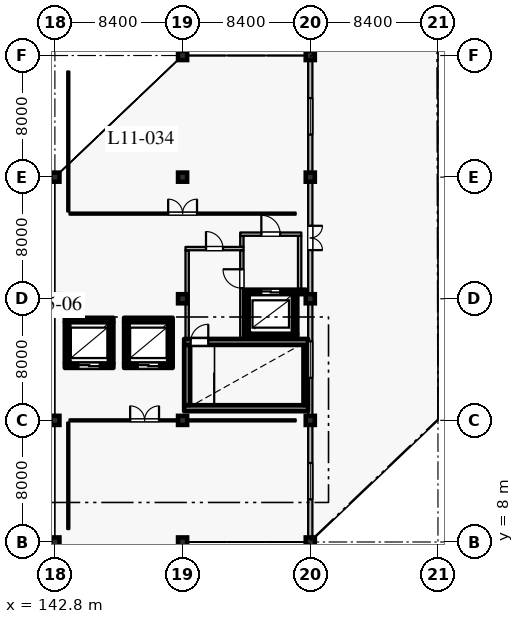
"""IFC4 building model, lengths in metres.
Left out: names, types, materials, properties, quantities, classifications, styles, units other than length and angle.
Written with IfcOpenShell. Run it as: python <this file> out.ifc"""

import sys

from ifc_helpers import new_model, si_unit, direction, frame, frame_2d, origin, origin_2d, place, context, subcontext, project, spatial, rectangle, extrude, element, fill, save


model = new_model("IFC4")
c1 = context("Model", 3, precision=1e-05, world=origin(), true_north=direction((0.0, 1.0)))
c2 = subcontext(c1, "Body", "Model", "MODEL_VIEW")
j1 = project(units=[si_unit("LENGTHUNIT", "METRE"), si_unit("PLANEANGLEUNIT", "RADIAN")], contexts=[c1])
p1 = place(None, origin())
s1 = spatial("IfcSite", under=j1, at=p1, CompositionType="ELEMENT")
p2 = place(p1, origin())
s2 = spatial("IfcBuilding", under=s1, at=p2, CompositionType="ELEMENT")
p3 = place(p2, frame((0.0, 0.0, 47.4)))
s3 = spatial("IfcBuildingStorey", under=s2, at=p3, CompositionType="ELEMENT", Elevation=47.4)
for number, where, z_axis, x_axis in (
    (1, (142.8, 16.0, 0.0), (0.0, 0.0, 1.0), (1.0, 0.0, 0.0)),
    (2, (142.8, 32.0, 0.0), (0.0, 0.0, 1.0), (1.0, 0.0, 0.0)),
    (3, (151.2, 8.0, 0.0), (0.0, 0.0, 1.0), (1.0, 0.0, 0.0)),
    (4, (151.2, 24.0, 0.0), (0.0, 0.0, 1.0), (1.0, 0.0, 0.0)),
    (5, (151.2, 40.0, 0.0), (0.0, 0.0, 1.0), (1.0, 0.0, 0.0)),
    (6, (159.6, 8.0, 0.0), (0.0, 0.0, 1.0), (1.0, 0.0, 0.0)),
    (7, (159.6, 24.0, 0.0), (0.0, 0.0, 1.0), (1.0, 0.0, 0.0)),
    (8, (159.6, 40.0, 0.0), (0.0, 0.0, 1.0), (1.0, 0.0, 0.0)),
    (9, (142.8, 8.0, 0.0), (0.0, 0.0, 1.0), (1.0, 0.0, 0.0)),
    (10, (142.8, 24.0, 0.0), (0.0, 0.0, 1.0), (1.0, 0.0, 0.0)),
    (11, (151.2, 16.0, 0.0), (0.0, 0.0, 1.0), (1.0, 0.0, 0.0)),
    (12, (151.2, 32.0, 0.0), (0.0, 0.0, 1.0), (1.0, 0.0, 0.0)),
    (13, (159.6, 16.0, 0.0), (0.0, 0.0, 1.0), (1.0, 0.0, 0.0)),
    (14, (159.6, 32.0, 0.0), (0.0, 0.0, 1.0), (1.0, 0.0, 0.0)),
):
    element("IfcColumn", number, at=place(p3, frame(where, z_axis=z_axis, x_axis=x_axis)), inside=s3, PredefinedType="COLUMN", context=c2, shape_type="SweptSolid", body=[
        extrude(rectangle(XDim=0.6, YDim=0.6, at=origin_2d()), origin(), (0.0, 0.0, 1.0), 4.2),
    ])
p4 = place(p3, frame((159.6, 39.7, 0.0), z_axis=(0.0, 0.0, 1.0), x_axis=(0.0, -1.0, 0.0)))
e15 = element("IfcWall", 15, at=p4, inside=s3, PredefinedType="SOLIDWALL", context=c2, shape_type="SweptSolid", body=[
    extrude(rectangle(XDim=7.4, YDim=0.28, at=frame_2d((3.7, 0.0))), origin(), (0.0, 0.0, 1.0), 3.3),
])
p5 = place(p4, frame((2.5, 0.0, 0.75)))
e16 = element("IfcOpeningElement", 16, at=p5, cuts=e15, PredefinedType="OPENING", context=c2, shape_type="SweptSolid", body=[
    extrude(rectangle(XDim=2.4, YDim=1.65, at=frame_2d((1.2, 0.825))), frame((0.0, 0.15, 0.0), z_axis=(0.0, -1.0, 0.0), x_axis=(1.0, 0.0, 0.0)), (0.0, 0.0, 1.0), 0.3),
])
p6 = place(p3, frame((159.6, 31.7, 0.0), z_axis=(0.0, 0.0, 1.0), x_axis=(0.0, -1.0, 0.0)))
e17 = element("IfcWall", 17, at=p6, inside=s3, PredefinedType="SOLIDWALL", context=c2, shape_type="SweptSolid", body=[
    extrude(rectangle(XDim=7.4, YDim=0.28, at=frame_2d((3.7, 0.0))), origin(), (0.0, 0.0, 1.0), 3.3),
])
p7 = place(p6, frame((2.9, 0.0, 0.0)))
e18 = element("IfcOpeningElement", 18, at=p7, cuts=e17, PredefinedType="OPENING", context=c2, shape_type="SweptSolid", body=[
    extrude(rectangle(XDim=1.6, YDim=2.25, at=frame_2d((0.8, 1.125))), frame((0.0, 0.15, 0.0), z_axis=(0.0, -1.0, 0.0), x_axis=(1.0, 0.0, 0.0)), (0.0, 0.0, 1.0), 0.3),
])
p8 = place(p3, frame((159.6, 23.7, 0.0), z_axis=(0.0, 0.0, 1.0), x_axis=(0.0, -1.0, 0.0)))
e19 = element("IfcWall", 19, at=p8, inside=s3, PredefinedType="SOLIDWALL", context=c2, shape_type="SweptSolid", body=[
    extrude(rectangle(XDim=7.4, YDim=0.28, at=frame_2d((3.7, 0.0))), origin(), (0.0, 0.0, 1.0), 3.3),
])
p9 = place(p8, frame((2.5, 0.0, 0.75)))
e20 = element("IfcOpeningElement", 20, at=p9, cuts=e19, PredefinedType="OPENING", context=c2, shape_type="SweptSolid", body=[
    extrude(rectangle(XDim=2.4, YDim=1.65, at=frame_2d((1.2, 0.825))), frame((0.0, 0.15, 0.0), z_axis=(0.0, -1.0, 0.0), x_axis=(1.0, 0.0, 0.0)), (0.0, 0.0, 1.0), 0.3),
])
p10 = place(p3, frame((159.6, 15.7, 0.0), z_axis=(0.0, 0.0, 1.0), x_axis=(0.0, -1.0, 0.0)))
e21 = element("IfcWall", 21, at=p10, inside=s3, PredefinedType="SOLIDWALL", context=c2, shape_type="SweptSolid", body=[
    extrude(rectangle(XDim=7.4, YDim=0.28, at=frame_2d((3.7, 0.0))), origin(), (0.0, 0.0, 1.0), 3.3),
])
p11 = place(p10, frame((2.5, 0.0, 0.75)))
e22 = element("IfcOpeningElement", 22, at=p11, cuts=e21, PredefinedType="OPENING", context=c2, shape_type="SweptSolid", body=[
    extrude(rectangle(XDim=2.4, YDim=1.65, at=frame_2d((1.2, 0.825))), frame((0.0, 0.15, 0.0), z_axis=(0.0, -1.0, 0.0), x_axis=(1.0, 0.0, 0.0)), (0.0, 0.0, 1.0), 0.3),
])
p12 = place(p3, frame((155.25, 21.55, 0.0), z_axis=(0.0, 0.0, 1.0), x_axis=(1.0, 0.0, 0.0)))
e23 = element("IfcWall", 23, at=p12, inside=s3, PredefinedType="SHEAR", context=c2, shape_type="SweptSolid", body=[
    extrude(rectangle(XDim=3.5, YDim=0.3, at=frame_2d((1.75, 0.0))), origin(), (0.0, 0.0, 1.0), 3.935),
])
p13 = place(p3, frame((158.6, 21.705, 0.0), z_axis=(0.0, 0.0, 1.0), x_axis=(0.0, 1.0, 0.0)))
e24 = element("IfcWall", 24, at=p13, inside=s3, PredefinedType="SHEAR", context=c2, shape_type="SweptSolid", body=[
    extrude(rectangle(XDim=2.59, YDim=0.3, at=frame_2d((1.295, 0.0))), origin(), (0.0, 0.0, 1.0), 3.935),
])
p14 = place(p3, frame((159.31, 24.45, 0.0), z_axis=(0.0, 0.0, 1.0), x_axis=(-1.0, 0.0, 0.0)))
e25 = element("IfcWall", 25, at=p14, inside=s3, PredefinedType="SHEAR", context=c2, shape_type="SweptSolid", body=[
    extrude(rectangle(XDim=4.06, YDim=0.3, at=frame_2d((2.03, 0.0))), origin(), (0.0, 0.0, 1.0), 3.935),
])
p15 = place(p14, frame((1.685, 0.0, 0.0)))
e26 = element("IfcOpeningElement", 26, at=p15, cuts=e25, PredefinedType="OPENING", context=c2, shape_type="SweptSolid", body=[
    extrude(rectangle(XDim=1.25, YDim=2.25, at=frame_2d((0.625, 1.125))), frame((0.0, 0.16, 0.0), z_axis=(0.0, -1.0, 0.0), x_axis=(1.0, 0.0, 0.0)), (0.0, 0.0, 1.0), 0.32),
])
p16 = place(p3, frame((155.4, 24.295, 0.0), z_axis=(0.0, 0.0, 1.0), x_axis=(0.0, -1.0, 0.0)))
e27 = element("IfcWall", 27, at=p16, inside=s3, PredefinedType="SHEAR", context=c2, shape_type="SweptSolid", body=[
    extrude(rectangle(XDim=2.59, YDim=0.3, at=frame_2d((1.295, 0.0))), origin(), (0.0, 0.0, 1.0), 3.935),
])
p17 = place(p3, frame((143.45, 19.6, 0.0), z_axis=(0.0, 0.0, 1.0), x_axis=(1.0, 0.0, 0.0)))
e28 = element("IfcWall", 28, at=p17, inside=s3, PredefinedType="SHEAR", context=c2, shape_type="SweptSolid", body=[
    extrude(rectangle(XDim=3.2, YDim=0.3, at=frame_2d((1.6, 0.0))), origin(), (0.0, 0.0, 1.0), 3.935),
])
p18 = place(p17, frame((0.9, 0.0, 0.0)))
e29 = element("IfcOpeningElement", 29, at=p18, cuts=e28, PredefinedType="OPENING", context=c2, shape_type="SweptSolid", body=[
    extrude(rectangle(XDim=1.4, YDim=2.35, at=frame_2d((0.7, 1.175))), frame((0.0, 0.16, 0.0), z_axis=(0.0, -1.0, 0.0), x_axis=(1.0, 0.0, 0.0)), (0.0, 0.0, 1.0), 0.32),
])
p19 = place(p3, frame((146.5, 19.755, 0.0), z_axis=(0.0, 0.0, 1.0), x_axis=(0.0, 1.0, 0.0)))
e30 = element("IfcWall", 30, at=p19, inside=s3, PredefinedType="SHEAR", context=c2, shape_type="SweptSolid", body=[
    extrude(rectangle(XDim=2.69, YDim=0.3, at=frame_2d((1.345, 0.0))), origin(), (0.0, 0.0, 1.0), 3.935),
])
p20 = place(p3, frame((146.65, 22.6, 0.0), z_axis=(0.0, 0.0, 1.0), x_axis=(-1.0, 0.0, 0.0)))
e31 = element("IfcWall", 31, at=p20, inside=s3, PredefinedType="SHEAR", context=c2, shape_type="SweptSolid", body=[
    extrude(rectangle(XDim=3.2, YDim=0.3, at=frame_2d((1.6, 0.0))), origin(), (0.0, 0.0, 1.0), 3.935),
])
p21 = place(p3, frame((143.6, 22.445, 0.0), z_axis=(0.0, 0.0, 1.0), x_axis=(0.0, -1.0, 0.0)))
e32 = element("IfcWall", 32, at=p21, inside=s3, PredefinedType="SHEAR", context=c2, shape_type="SweptSolid", body=[
    extrude(rectangle(XDim=2.69, YDim=0.3, at=frame_2d((1.345, 0.0))), origin(), (0.0, 0.0, 1.0), 3.935),
])
p22 = place(p3, frame((147.35, 19.6, 0.0), z_axis=(0.0, 0.0, 1.0), x_axis=(1.0, 0.0, 0.0)))
e33 = element("IfcWall", 33, at=p22, inside=s3, PredefinedType="SHEAR", context=c2, shape_type="SweptSolid", body=[
    extrude(rectangle(XDim=3.2, YDim=0.3, at=frame_2d((1.6, 0.0))), origin(), (0.0, 0.0, 1.0), 3.935),
])
p23 = place(p22, frame((0.9, 0.0, 0.0)))
e34 = element("IfcOpeningElement", 34, at=p23, cuts=e33, PredefinedType="OPENING", context=c2, shape_type="SweptSolid", body=[
    extrude(rectangle(XDim=1.4, YDim=2.35, at=frame_2d((0.7, 1.175))), frame((0.0, 0.16, 0.0), z_axis=(0.0, -1.0, 0.0), x_axis=(1.0, 0.0, 0.0)), (0.0, 0.0, 1.0), 0.32),
])
p24 = place(p3, frame((150.4, 19.755, 0.0), z_axis=(0.0, 0.0, 1.0), x_axis=(0.0, 1.0, 0.0)))
e35 = element("IfcWall", 35, at=p24, inside=s3, PredefinedType="SHEAR", context=c2, shape_type="SweptSolid", body=[
    extrude(rectangle(XDim=2.69, YDim=0.3, at=frame_2d((1.345, 0.0))), origin(), (0.0, 0.0, 1.0), 3.935),
])
p25 = place(p3, frame((150.55, 22.6, 0.0), z_axis=(0.0, 0.0, 1.0), x_axis=(-1.0, 0.0, 0.0)))
e36 = element("IfcWall", 36, at=p25, inside=s3, PredefinedType="SHEAR", context=c2, shape_type="SweptSolid", body=[
    extrude(rectangle(XDim=3.2, YDim=0.3, at=frame_2d((1.6, 0.0))), origin(), (0.0, 0.0, 1.0), 3.935),
])
p26 = place(p3, frame((147.5, 22.445, 0.0), z_axis=(0.0, 0.0, 1.0), x_axis=(0.0, -1.0, 0.0)))
e37 = element("IfcWall", 37, at=p26, inside=s3, PredefinedType="SHEAR", context=c2, shape_type="SweptSolid", body=[
    extrude(rectangle(XDim=2.69, YDim=0.3, at=frame_2d((1.345, 0.0))), origin(), (0.0, 0.0, 1.0), 3.935),
])
p27 = place(p3, frame((151.3, 16.8, 0.0), z_axis=(0.0, 0.0, 1.0), x_axis=(1.0, 0.0, 0.0)))
e38 = element("IfcWall", 38, at=p27, inside=s3, PredefinedType="SHEAR", context=c2, shape_type="SweptSolid", body=[
    extrude(rectangle(XDim=8.15, YDim=0.4, at=frame_2d((4.075, 0.0))), origin(), (0.0, 0.0, 1.0), 3.935),
])
p28 = place(p3, frame((159.3, 17.005, 0.0), z_axis=(0.0, 0.0, 1.0), x_axis=(0.0, 1.0, 0.0)))
e39 = element("IfcWall", 39, at=p28, inside=s3, PredefinedType="SHEAR", context=c2, shape_type="SweptSolid", body=[
    extrude(rectangle(XDim=3.95, YDim=0.3, at=frame_2d((1.975, 0.0))), origin(), (0.0, 0.0, 1.0), 3.935),
])
p29 = place(p3, frame((151.3, 21.16, 0.0), z_axis=(0.0, 0.0, 1.0), x_axis=(1.0, 0.0, 0.0)))
e40 = element("IfcWall", 40, at=p29, inside=s3, PredefinedType="SHEAR", context=c2, shape_type="SweptSolid", body=[
    extrude(rectangle(XDim=8.15, YDim=0.4, at=frame_2d((4.075, 0.0))), origin(), (0.0, 0.0, 1.0), 3.935),
])
p30 = place(p29, frame((0.43, 0.0, 0.0)))
e41 = element("IfcOpeningElement", 41, at=p30, cuts=e40, PredefinedType="OPENING", context=c2, shape_type="SweptSolid", body=[
    extrude(rectangle(XDim=1.16, YDim=2.2, at=frame_2d((0.58, 1.1))), frame((0.0, 0.21, 0.0), z_axis=(0.0, -1.0, 0.0), x_axis=(1.0, 0.0, 0.0)), (0.0, 0.0, 1.0), 0.42),
])
p31 = place(p3, frame((151.5, 17.005, 0.0), z_axis=(0.0, 0.0, 1.0), x_axis=(0.0, 1.0, 0.0)))
e42 = element("IfcWall", 42, at=p31, inside=s3, PredefinedType="SHEAR", context=c2, shape_type="SweptSolid", body=[
    extrude(rectangle(XDim=3.95, YDim=0.4, at=frame_2d((1.975, 0.0))), origin(), (0.0, 0.0, 1.0), 3.935),
])
p32 = place(p3, frame((151.5, 21.365, 0.0), z_axis=(0.0, 0.0, 1.0), x_axis=(0.0, 1.0, 0.0)))
e43 = element("IfcWall", 43, at=p32, inside=s3, PredefinedType="PARTITIONING", context=c2, shape_type="SweptSolid", body=[
    extrude(rectangle(XDim=5.82, YDim=0.22, at=frame_2d((2.91, 0.0))), origin(), (0.0, 0.0, 1.0), 3.935),
])
p33 = place(p3, frame((151.39, 27.3, 0.0), z_axis=(0.0, 0.0, 1.0), x_axis=(1.0, 0.0, 0.0)))
e44 = element("IfcWall", 44, at=p33, inside=s3, PredefinedType="PARTITIONING", context=c2, shape_type="SweptSolid", body=[
    extrude(rectangle(XDim=3.82, YDim=0.22, at=frame_2d((1.91, 0.0))), origin(), (0.0, 0.0, 1.0), 3.935),
])
p34 = place(p33, frame((1.35, 0.0, 0.0)))
e45 = element("IfcOpeningElement", 45, at=p34, cuts=e44, PredefinedType="OPENING", context=c2, shape_type="SweptSolid", body=[
    extrude(rectangle(XDim=1.12, YDim=2.2, at=frame_2d((0.56, 1.1))), frame((0.0, 0.12, 0.0), z_axis=(0.0, -1.0, 0.0), x_axis=(1.0, 0.0, 0.0)), (0.0, 0.0, 1.0), 0.24),
])
p35 = place(p3, frame((155.1, 21.365, 0.0), z_axis=(0.0, 0.0, 1.0), x_axis=(0.0, 1.0, 0.0)))
e46 = element("IfcWall", 46, at=p35, inside=s3, PredefinedType="PARTITIONING", context=c2, shape_type="SweptSolid", body=[
    extrude(rectangle(XDim=5.82, YDim=0.22, at=frame_2d((2.91, 0.0))), origin(), (0.0, 0.0, 1.0), 3.935),
])
p36 = place(p35, frame((3.335, 0.0, 0.0)))
e47 = element("IfcOpeningElement", 47, at=p36, cuts=e46, PredefinedType="OPENING", context=c2, shape_type="SweptSolid", body=[
    extrude(rectangle(XDim=1.24, YDim=2.2, at=frame_2d((0.62, 1.1))), frame((0.0, 0.12, 0.0), z_axis=(0.0, -1.0, 0.0), x_axis=(1.0, 0.0, 0.0)), (0.0, 0.0, 1.0), 0.24),
])
p37 = place(p3, frame((155.1, 27.415, 0.0), z_axis=(0.0, 0.0, 1.0), x_axis=(0.0, 1.0, 0.0)))
e48 = element("IfcWall", 48, at=p37, inside=s3, PredefinedType="PARTITIONING", context=c2, shape_type="SweptSolid", body=[
    extrude(rectangle(XDim=0.72, YDim=0.22, at=frame_2d((0.36, 0.0))), origin(), (0.0, 0.0, 1.0), 3.935),
])
p38 = place(p3, frame((158.9, 24.605, 0.0), z_axis=(0.0, 0.0, 1.0), x_axis=(0.0, 1.0, 0.0)))
e49 = element("IfcWall", 49, at=p38, inside=s3, PredefinedType="PARTITIONING", context=c2, shape_type="SweptSolid", body=[
    extrude(rectangle(XDim=3.53, YDim=0.22, at=frame_2d((1.765, 0.0))), origin(), (0.0, 0.0, 1.0), 3.935),
])
p39 = place(p3, frame((154.99, 28.25, 0.0), z_axis=(0.0, 0.0, 1.0), x_axis=(1.0, 0.0, 0.0)))
e50 = element("IfcWall", 50, at=p39, inside=s3, PredefinedType="PARTITIONING", context=c2, shape_type="SweptSolid", body=[
    extrude(rectangle(XDim=4.02, YDim=0.22, at=frame_2d((2.01, 0.0))), origin(), (0.0, 0.0, 1.0), 3.935),
])
p40 = place(p39, frame((1.39, 0.0, 0.0)))
e51 = element("IfcOpeningElement", 51, at=p40, cuts=e50, PredefinedType="OPENING", context=c2, shape_type="SweptSolid", body=[
    extrude(rectangle(XDim=1.24, YDim=2.2, at=frame_2d((0.62, 1.1))), frame((0.0, 0.12, 0.0), z_axis=(0.0, -1.0, 0.0), x_axis=(1.0, 0.0, 0.0)), (0.0, 0.0, 1.0), 0.24),
])
p41 = place(p3, frame((143.76, 16.0, 0.0), z_axis=(0.0, 0.0, 1.0), x_axis=(1.0, 0.0, 0.0)))
e52 = element("IfcWall", 52, at=p41, inside=s3, PredefinedType="PARTITIONING", context=c2, shape_type="SweptSolid", body=[
    extrude(rectangle(XDim=7.736, YDim=0.14, at=frame_2d((3.868, 0.0))), origin(), (0.0, 0.0, 1.0), 3.935),
])
p42 = place(p41, frame((3.99, 0.0, 0.0)))
e53 = element("IfcOpeningElement", 53, at=p42, cuts=e52, PredefinedType="OPENING", context=c2, shape_type="SweptSolid", body=[
    extrude(rectangle(XDim=1.9, YDim=2.4, at=frame_2d((0.95, 1.2))), frame((0.0, 0.08, 0.0), z_axis=(0.0, -1.0, 0.0), x_axis=(1.0, 0.0, 0.0)), (0.0, 0.0, 1.0), 0.16),
])
p43 = place(p3, frame((143.68, 8.85, 0.0), z_axis=(0.0, 0.0, 1.0), x_axis=(0.0, 1.0, 0.0)))
e54 = element("IfcWall", 54, at=p43, inside=s3, PredefinedType="PARTITIONING", context=c2, shape_type="SweptSolid", body=[
    extrude(rectangle(XDim=7.01, YDim=0.14, at=frame_2d((3.505, 0.0))), origin(), (0.0, 0.0, 1.0), 3.935),
])
p44 = place(p3, frame((143.76, 29.6, 0.0), z_axis=(0.0, 0.0, 1.0), x_axis=(1.0, 0.0, 0.0)))
e55 = element("IfcWall", 55, at=p44, inside=s3, PredefinedType="PARTITIONING", context=c2, shape_type="SweptSolid", body=[
    extrude(rectangle(XDim=14.88, YDim=0.14, at=frame_2d((7.44, 0.0))), origin(), (0.0, 0.0, 1.0), 3.935),
])
p45 = place(p44, frame((6.49, 0.0, 0.0)))
e56 = element("IfcOpeningElement", 56, at=p45, cuts=e55, PredefinedType="OPENING", context=c2, shape_type="SweptSolid", body=[
    extrude(rectangle(XDim=1.9, YDim=2.4, at=frame_2d((0.95, 1.2))), frame((0.0, 0.08, 0.0), z_axis=(0.0, -1.0, 0.0), x_axis=(1.0, 0.0, 0.0)), (0.0, 0.0, 1.0), 0.16),
])
p46 = place(p3, frame((143.68, 29.74, 0.0), z_axis=(0.0, 0.0, 1.0), x_axis=(0.0, 1.0, 0.0)))
e57 = element("IfcWall", 57, at=p46, inside=s3, PredefinedType="PARTITIONING", context=c2, shape_type="SweptSolid", body=[
    extrude(rectangle(XDim=9.21, YDim=0.14, at=frame_2d((4.605, 0.0))), origin(), (0.0, 0.0, 1.0), 3.935),
])
p47 = place(p3, frame((151.496, 16.0, 0.0), z_axis=(0.0, 0.0, 1.0), x_axis=(1.0, 0.0, 0.0)))
e58 = element("IfcWall", 58, at=p47, inside=s3, PredefinedType="PARTITIONING", context=c2, shape_type="SweptSolid", body=[
    extrude(rectangle(XDim=7.144, YDim=0.14, at=frame_2d((3.572, 0.0))), origin(), (0.0, 0.0, 1.0), 3.39),
])
p48 = place(p5, origin())
e59 = element("IfcWindow", 59, at=p48, inside=s3, PartitioningType="DOUBLE_PANEL_VERTICAL", PredefinedType="WINDOW", context=c2, shape_type="SweptSolid", body=[
    extrude(rectangle(XDim=2.4, YDim=1.65, at=frame_2d((1.2, 0.825))), frame((0.0, 0.03, 0.0), z_axis=(0.0, -1.0, 0.0), x_axis=(1.0, 0.0, 0.0)), (0.0, 0.0, 1.0), 0.06),
])
fill(e16, e59)
p49 = place(p7, origin())
e60 = element("IfcDoor", 60, at=p49, inside=s3, OperationType="DOUBLE_DOOR_SINGLE_SWING", PredefinedType="DOOR", context=c2, shape_type="SweptSolid", body=[
    extrude(rectangle(XDim=1.6, YDim=2.25, at=frame_2d((0.8, 1.125))), frame((0.0, 0.025, 0.0), z_axis=(0.0, -1.0, 0.0), x_axis=(1.0, 0.0, 0.0)), (0.0, 0.0, 1.0), 0.05),
])
fill(e18, e60)
p50 = place(p9, origin())
e61 = element("IfcWindow", 61, at=p50, inside=s3, PartitioningType="DOUBLE_PANEL_VERTICAL", PredefinedType="WINDOW", context=c2, shape_type="SweptSolid", body=[
    extrude(rectangle(XDim=2.4, YDim=1.65, at=frame_2d((1.2, 0.825))), frame((0.0, 0.03, 0.0), z_axis=(0.0, -1.0, 0.0), x_axis=(1.0, 0.0, 0.0)), (0.0, 0.0, 1.0), 0.06),
])
fill(e20, e61)
p51 = place(p11, origin())
e62 = element("IfcWindow", 62, at=p51, inside=s3, PartitioningType="DOUBLE_PANEL_VERTICAL", PredefinedType="WINDOW", context=c2, shape_type="SweptSolid", body=[
    extrude(rectangle(XDim=2.4, YDim=1.65, at=frame_2d((1.2, 0.825))), frame((0.0, 0.03, 0.0), z_axis=(0.0, -1.0, 0.0), x_axis=(1.0, 0.0, 0.0)), (0.0, 0.0, 1.0), 0.06),
])
fill(e22, e62)
p52 = place(p15, origin())
e63 = element("IfcDoor", 63, at=p52, inside=s3, OperationType="DOUBLE_DOOR_SLIDING", PredefinedType="DOOR", context=c2, shape_type="SweptSolid", body=[
    extrude(rectangle(XDim=1.25, YDim=2.25, at=frame_2d((0.625, 1.125))), frame((0.0, 0.025, 0.0), z_axis=(0.0, -1.0, 0.0), x_axis=(1.0, 0.0, 0.0)), (0.0, 0.0, 1.0), 0.05),
])
fill(e26, e63)
p53 = place(p18, origin())
e64 = element("IfcDoor", 64, at=p53, inside=s3, OperationType="DOUBLE_DOOR_SLIDING", PredefinedType="DOOR", context=c2, shape_type="SweptSolid", body=[
    extrude(rectangle(XDim=1.4, YDim=2.35, at=frame_2d((0.7, 1.175))), frame((0.0, 0.025, 0.0), z_axis=(0.0, -1.0, 0.0), x_axis=(1.0, 0.0, 0.0)), (0.0, 0.0, 1.0), 0.05),
])
fill(e29, e64)
p54 = place(p23, origin())
e65 = element("IfcDoor", 65, at=p54, inside=s3, OperationType="DOUBLE_DOOR_SLIDING", PredefinedType="DOOR", context=c2, shape_type="SweptSolid", body=[
    extrude(rectangle(XDim=1.4, YDim=2.35, at=frame_2d((0.7, 1.175))), frame((0.0, 0.025, 0.0), z_axis=(0.0, -1.0, 0.0), x_axis=(1.0, 0.0, 0.0)), (0.0, 0.0, 1.0), 0.05),
])
fill(e34, e65)
p55 = place(p30, origin())
e66 = element("IfcDoor", 66, at=p55, inside=s3, OperationType="SINGLE_SWING_RIGHT", PredefinedType="DOOR", context=c2, shape_type="SweptSolid", body=[
    extrude(rectangle(XDim=1.16, YDim=2.2, at=frame_2d((0.58, 1.1))), frame((0.0, 0.025, 0.0), z_axis=(0.0, -1.0, 0.0), x_axis=(1.0, 0.0, 0.0)), (0.0, 0.0, 1.0), 0.05),
])
fill(e41, e66)
p56 = place(p34, origin())
e67 = element("IfcDoor", 67, at=p56, inside=s3, OperationType="SINGLE_SWING_LEFT", PredefinedType="DOOR", context=c2, shape_type="SweptSolid", body=[
    extrude(rectangle(XDim=1.12, YDim=2.2, at=frame_2d((0.56, 1.1))), frame((0.0, 0.025, 0.0), z_axis=(0.0, -1.0, 0.0), x_axis=(1.0, 0.0, 0.0)), (0.0, 0.0, 1.0), 0.05),
])
fill(e45, e67)
p57 = place(p36, origin())
e68 = element("IfcDoor", 68, at=p57, inside=s3, OperationType="SINGLE_SWING_RIGHT", PredefinedType="DOOR", context=c2, shape_type="SweptSolid", body=[
    extrude(rectangle(XDim=1.24, YDim=2.2, at=frame_2d((0.62, 1.1))), frame((0.0, 0.025, 0.0), z_axis=(0.0, -1.0, 0.0), x_axis=(1.0, 0.0, 0.0)), (0.0, 0.0, 1.0), 0.05),
])
fill(e47, e68)
p58 = place(p40, origin())
e69 = element("IfcDoor", 69, at=p58, inside=s3, OperationType="SINGLE_SWING_LEFT", PredefinedType="DOOR", context=c2, shape_type="SweptSolid", body=[
    extrude(rectangle(XDim=1.24, YDim=2.2, at=frame_2d((0.62, 1.1))), frame((0.0, 0.025, 0.0), z_axis=(0.0, -1.0, 0.0), x_axis=(1.0, 0.0, 0.0)), (0.0, 0.0, 1.0), 0.05),
])
fill(e51, e69)
p59 = place(p42, origin())
e70 = element("IfcDoor", 70, at=p59, inside=s3, OperationType="DOUBLE_DOOR_SINGLE_SWING", PredefinedType="DOOR", context=c2, shape_type="SweptSolid", body=[
    extrude(rectangle(XDim=1.9, YDim=2.4, at=frame_2d((0.95, 1.2))), frame((0.0, 0.025, 0.0), z_axis=(0.0, -1.0, 0.0), x_axis=(1.0, 0.0, 0.0)), (0.0, 0.0, 1.0), 0.05),
])
fill(e53, e70)
p60 = place(p45, origin())
e71 = element("IfcDoor", 71, at=p60, inside=s3, OperationType="DOUBLE_DOOR_SINGLE_SWING", PredefinedType="DOOR", context=c2, shape_type="SweptSolid", body=[
    extrude(rectangle(XDim=1.9, YDim=2.4, at=frame_2d((0.95, 1.2))), frame((0.0, 0.025, 0.0), z_axis=(0.0, -1.0, 0.0), x_axis=(1.0, 0.0, 0.0)), (0.0, 0.0, 1.0), 0.05),
])
fill(e56, e71)
save(model, sys.argv[1])
